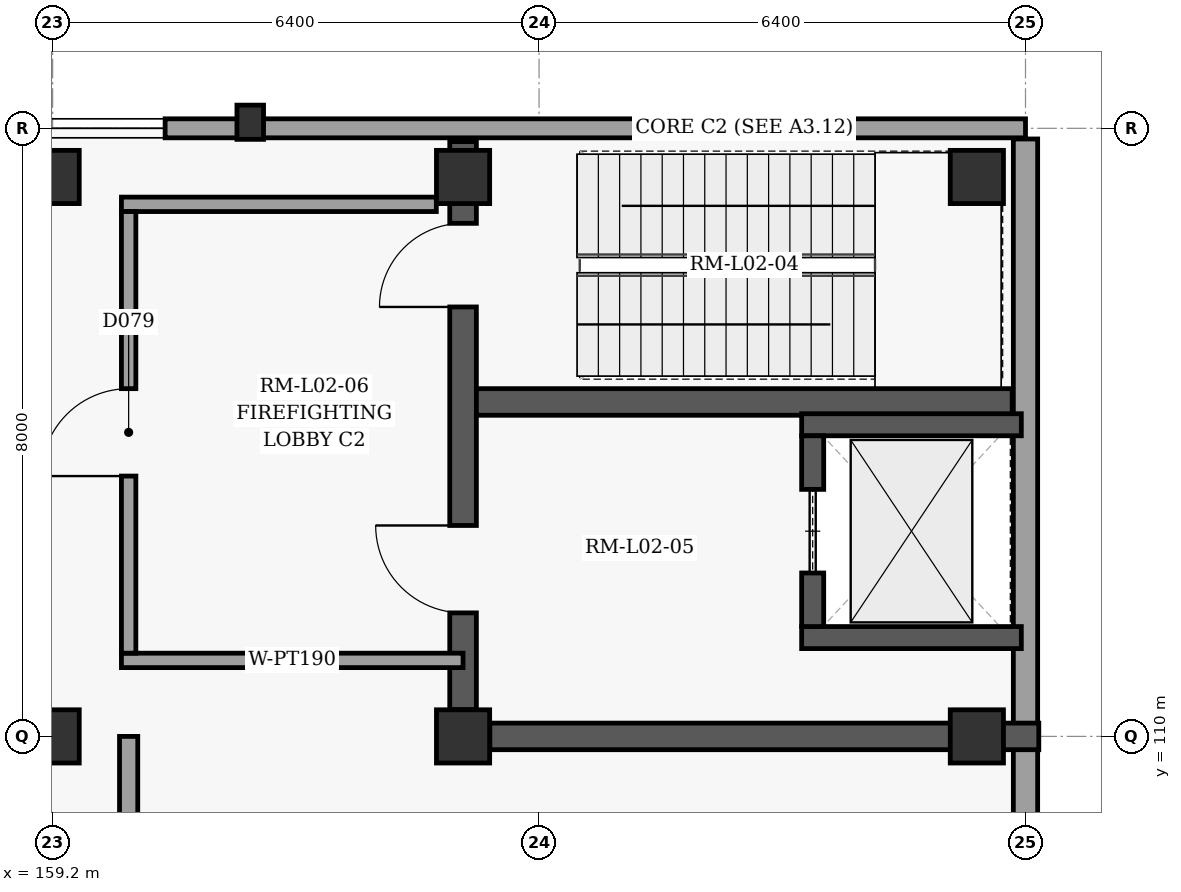
"""IFC4 building model, lengths in metres.
Left out: names, types, materials, properties, quantities, classifications, styles, units other than length and angle.
Written with IfcOpenShell. Run it as: python <this file> out.ifc"""

import sys

from ifc_helpers import new_model, si_unit, direction, frame, frame_2d, origin, origin_2d, place, context, subcontext, project, spatial, rectangle, extrude, element, fill, save


model = new_model("IFC4")
c1 = context("Model", 3, precision=1e-05, world=origin(), true_north=direction((0.0, 1.0)))
c2 = subcontext(c1, "Body", "Model", "MODEL_VIEW")
j1 = project(units=[si_unit("LENGTHUNIT", "METRE"), si_unit("PLANEANGLEUNIT", "RADIAN")], contexts=[c1])
p1 = place(None, origin())
s1 = spatial("IfcSite", under=j1, at=p1, CompositionType="ELEMENT")
p2 = place(p1, origin())
s2 = spatial("IfcBuilding", under=s1, at=p2, CompositionType="ELEMENT")
p3 = place(p2, frame((0.0, 0.0, 10.2)))
s3 = spatial("IfcBuildingStorey", under=s2, at=p3, CompositionType="ELEMENT", Elevation=10.2)
for number, where, z_axis, x_axis in (
    (1, (159.2, 110.0, 0.0), (0.0, 0.0, 1.0), (1.0, 0.0, 0.0)),
    (2, (159.2, 117.36, 0.0), (0.0, 0.0, 1.0), (1.0, 0.0, 0.0)),
    (3, (164.6, 110.0, 0.0), (0.0, 0.0, 1.0), (1.0, 0.0, 0.0)),
    (4, (164.6, 117.36, 0.0), (0.0, 0.0, 1.0), (1.0, 0.0, 0.0)),
    (5, (171.36, 110.0, 0.0), (0.0, 0.0, 1.0), (1.0, 0.0, 0.0)),
    (6, (171.36, 117.36, 0.0), (0.0, 0.0, 1.0), (1.0, 0.0, 0.0)),
):
    element("IfcColumn", number, at=place(p3, frame(where, z_axis=z_axis, x_axis=x_axis)), inside=s3, PredefinedType="COLUMN", context=c2, shape_type="SweptSolid", body=[
        extrude(rectangle(XDim=0.7, YDim=0.7, at=origin_2d()), origin(), (0.0, 0.0, 1.0), 5.4),
    ])
p4 = place(p3, frame((161.8, 118.08, 0.0), z_axis=(0.0, 0.0, 1.0), x_axis=(0.0, 1.0, 0.0)))
e7 = element("IfcColumn", 7, at=p4, inside=s3, PredefinedType="PILASTER", context=c2, shape_type="SweptSolid", body=[
    extrude(rectangle(XDim=0.35, YDim=0.45, at=origin_2d()), origin(), (0.0, 0.0, 1.0), 5.4),
])
p5 = place(p3, frame((139.6, 118.0, 0.0), z_axis=(0.0, 0.0, 1.0), x_axis=(1.0, 0.0, 0.0)))
e8 = element("IfcWall", 8, at=p5, inside=s3, PredefinedType="SOLIDWALL", context=c2, shape_type="SweptSolid", body=[
    extrude(rectangle(XDim=32.4, YDim=0.25, at=frame_2d((16.2, 0.0))), origin(), (0.0, 0.0, 1.0), 5.16),
])
p6 = place(p5, frame((2.2, 0.0, 0.9)))
e9 = element("IfcOpeningElement", 9, at=p6, cuts=e8, PredefinedType="OPENING", context=c2, shape_type="SweptSolid", body=[
    extrude(rectangle(XDim=3.4, YDim=2.55, at=frame_2d((1.7, 1.275))), frame((0.0, 0.135, 0.0), z_axis=(0.0, -1.0, 0.0), x_axis=(1.0, 0.0, 0.0)), (0.0, 0.0, 1.0), 0.27),
])
p7 = place(p5, frame((7.96, 0.0, 0.9)))
e10 = element("IfcOpeningElement", 10, at=p7, cuts=e8, PredefinedType="OPENING", context=c2, shape_type="SweptSolid", body=[
    extrude(rectangle(XDim=3.5, YDim=2.55, at=frame_2d((1.75, 1.275))), frame((0.0, 0.135, 0.0), z_axis=(0.0, -1.0, 0.0), x_axis=(1.0, 0.0, 0.0)), (0.0, 0.0, 1.0), 0.27),
])
p8 = place(p5, frame((12.27, 0.0, 0.9)))
e11 = element("IfcOpeningElement", 11, at=p8, cuts=e8, PredefinedType="OPENING", context=c2, shape_type="SweptSolid", body=[
    extrude(rectangle(XDim=3.6, YDim=2.6, at=frame_2d((1.8, 1.3))), frame((0.0, 0.135, 0.0), z_axis=(0.0, -1.0, 0.0), x_axis=(1.0, 0.0, 0.0)), (0.0, 0.0, 1.0), 0.27),
])
p9 = place(p5, frame((19.48, 0.0, 0.9)))
e12 = element("IfcOpeningElement", 12, at=p9, cuts=e8, PredefinedType="OPENING", context=c2, shape_type="SweptSolid", body=[
    extrude(rectangle(XDim=1.6, YDim=1.65, at=frame_2d((0.8, 0.825))), frame((0.0, 0.135, 0.0), z_axis=(0.0, -1.0, 0.0), x_axis=(1.0, 0.0, 0.0)), (0.0, 0.0, 1.0), 0.27),
])
p10 = place(p3, frame((172.0, 117.86, 0.0), z_axis=(0.0, 0.0, 1.0), x_axis=(0.0, -1.0, 0.0)))
e13 = element("IfcWall", 13, at=p10, inside=s3, PredefinedType="SOLIDWALL", context=c2, shape_type="SweptSolid", body=[
    extrude(rectangle(XDim=46.12, YDim=0.32, at=frame_2d((23.06, 0.0))), origin(), (0.0, 0.0, 1.0), 5.16),
])
p11 = place(p3, frame((164.952, 110.0, 0.0), z_axis=(0.0, 0.0, 1.0), x_axis=(1.0, 0.0, 0.0)))
e14 = element("IfcWall", 14, at=p11, inside=s3, PredefinedType="SHEAR", context=c2, shape_type="SweptSolid", body=[
    extrude(rectangle(XDim=7.223, YDim=0.35, at=frame_2d((3.612, 0.0))), origin(), (0.0, 0.0, 1.0), 5.16),
])
p12 = place(p3, frame((164.6, 110.352, 0.0), z_axis=(0.0, 0.0, 1.0), x_axis=(0.0, 1.0, 0.0)))
e15 = element("IfcWall", 15, at=p12, inside=s3, PredefinedType="SHEAR", context=c2, shape_type="SweptSolid", body=[
    extrude(rectangle(XDim=7.473, YDim=0.35, at=frame_2d((3.736, 0.0))), origin(), (0.0, 0.0, 1.0), 5.16),
])
p13 = place(p12, frame((5.298, 0.0, 0.0)))
e16 = element("IfcOpeningElement", 16, at=p13, cuts=e15, PredefinedType="OPENING", context=c2, shape_type="SweptSolid", body=[
    extrude(rectangle(XDim=1.1, YDim=2.15, at=frame_2d((0.55, 1.075))), frame((0.0, 0.185, 0.0), z_axis=(0.0, -1.0, 0.0), x_axis=(1.0, 0.0, 0.0)), (0.0, 0.0, 1.0), 0.37),
])
p14 = place(p12, frame((1.273, 0.0, 0.0)))
e17 = element("IfcOpeningElement", 17, at=p14, cuts=e15, PredefinedType="OPENING", context=c2, shape_type="SweptSolid", body=[
    extrude(rectangle(XDim=1.15, YDim=2.2, at=frame_2d((0.575, 1.1))), frame((0.0, 0.185, 0.0), z_axis=(0.0, -1.0, 0.0), x_axis=(1.0, 0.0, 0.0)), (0.0, 0.0, 1.0), 0.37),
])
p15 = place(p3, frame((164.775, 114.4, 0.0), z_axis=(0.0, 0.0, 1.0), x_axis=(1.0, 0.0, 0.0)))
e18 = element("IfcWall", 18, at=p15, inside=s3, PredefinedType="SHEAR", context=c2, shape_type="SweptSolid", body=[
    extrude(rectangle(XDim=7.05, YDim=0.35, at=frame_2d((3.525, 0.0))), origin(), (0.0, 0.0, 1.0), 5.16),
])
for number, where, z_axis, x_axis in (
    (19, (169.055, 111.3, 0.0), (0.0, 0.0, 1.0), (1.0, 0.0, 0.0)),
    (20, (169.055, 114.1, 0.0), (0.0, 0.0, 1.0), (1.0, 0.0, 0.0)),
):
    element("IfcWall", number, at=place(p3, frame(where, z_axis=z_axis, x_axis=x_axis)), inside=s3, PredefinedType="SHEAR", context=c2, shape_type="SweptSolid", body=[
        extrude(rectangle(XDim=2.89, YDim=0.29, at=frame_2d((1.445, 0.0))), origin(), (0.0, 0.0, 1.0), 5.16),
    ])
p16 = place(p3, frame((169.2, 111.445, 0.0), z_axis=(0.0, 0.0, 1.0), x_axis=(0.0, 1.0, 0.0)))
e21 = element("IfcWall", 21, at=p16, inside=s3, PredefinedType="SHEAR", context=c2, shape_type="SweptSolid", body=[
    extrude(rectangle(XDim=2.51, YDim=0.29, at=frame_2d((1.255, 0.0))), origin(), (0.0, 0.0, 1.0), 5.16),
])
p17 = place(p16, frame((0.705, 0.0, 0.0)))
e22 = element("IfcOpeningElement", 22, at=p17, cuts=e21, PredefinedType="OPENING", context=c2, shape_type="SweptSolid", body=[
    extrude(rectangle(XDim=1.1, YDim=2.15, at=frame_2d((0.55, 1.075))), frame((0.0, 0.155, 0.0), z_axis=(0.0, -1.0, 0.0), x_axis=(1.0, 0.0, 0.0)), (0.0, 0.0, 1.0), 0.31),
])
p18 = place(p3, frame((160.105, 111.0, 0.0), z_axis=(0.0, 0.0, 1.0), x_axis=(1.0, 0.0, 0.0)))
e23 = element("IfcWall", 23, at=p18, inside=s3, PredefinedType="PARTITIONING", context=c2, shape_type="SweptSolid", body=[
    extrude(rectangle(XDim=4.495, YDim=0.19, at=frame_2d((2.248, 0.0))), origin(), (0.0, 0.0, 1.0), 5.16),
])
p19 = place(p3, frame((160.105, 117.0, 0.0), z_axis=(0.0, 0.0, 1.0), x_axis=(1.0, 0.0, 0.0)))
e24 = element("IfcWall", 24, at=p19, inside=s3, PredefinedType="PARTITIONING", context=c2, shape_type="SweptSolid", body=[
    extrude(rectangle(XDim=4.143, YDim=0.19, at=frame_2d((2.072, 0.0))), origin(), (0.0, 0.0, 1.0), 4.51),
])
p20 = place(p3, frame((160.2, 111.095, 0.0), z_axis=(0.0, 0.0, 1.0), x_axis=(0.0, 1.0, 0.0)))
e25 = element("IfcWall", 25, at=p20, inside=s3, PredefinedType="PARTITIONING", context=c2, shape_type="SweptSolid", body=[
    extrude(rectangle(XDim=5.81, YDim=0.19, at=frame_2d((2.905, 0.0))), origin(), (0.0, 0.0, 1.0), 5.16),
])
p21 = place(p20, frame((2.33, 0.0, 0.0)))
e26 = element("IfcOpeningElement", 26, at=p21, cuts=e25, PredefinedType="OPENING", context=c2, shape_type="SweptSolid", body=[
    extrude(rectangle(XDim=1.15, YDim=2.2, at=frame_2d((0.575, 1.1))), frame((0.0, 0.105, 0.0), z_axis=(0.0, -1.0, 0.0), x_axis=(1.0, 0.0, 0.0)), (0.0, 0.0, 1.0), 0.21),
])
p22 = place(p3, frame((160.2, 110.0, 0.0), z_axis=(0.0, 0.0, 1.0), x_axis=(0.0, -1.0, 0.0)))
e27 = element("IfcWall", 27, at=p22, inside=s3, PredefinedType="PARTITIONING", context=c2, shape_type="SweptSolid", body=[
    extrude(rectangle(XDim=8.0, YDim=0.24, at=frame_2d((4.0, 0.0))), origin(), (0.0, 0.0, 1.0), 5.16),
])
p23 = place(p9, origin())
e28 = element("IfcWindow", 28, at=p23, inside=s3, PartitioningType="SINGLE_PANEL", PredefinedType="WINDOW", context=c2, shape_type="SweptSolid", body=[
    extrude(rectangle(XDim=1.6, YDim=1.65, at=frame_2d((0.8, 0.825))), frame((0.0, 0.03, 0.0), z_axis=(0.0, -1.0, 0.0), x_axis=(1.0, 0.0, 0.0)), (0.0, 0.0, 1.0), 0.06),
])
fill(e12, e28)
p24 = place(p13, origin())
e29 = element("IfcDoor", 29, at=p24, inside=s3, OperationType="SINGLE_SWING_LEFT", PredefinedType="DOOR", context=c2, shape_type="SweptSolid", body=[
    extrude(rectangle(XDim=1.1, YDim=2.15, at=frame_2d((0.55, 1.075))), frame((0.0, 0.025, 0.0), z_axis=(0.0, -1.0, 0.0), x_axis=(1.0, 0.0, 0.0)), (0.0, 0.0, 1.0), 0.05),
])
fill(e16, e29)
p25 = place(p14, origin())
e30 = element("IfcDoor", 30, at=p25, inside=s3, OperationType="SINGLE_SWING_RIGHT", PredefinedType="DOOR", context=c2, shape_type="SweptSolid", body=[
    extrude(rectangle(XDim=1.15, YDim=2.2, at=frame_2d((0.575, 1.1))), frame((0.0, 0.025, 0.0), z_axis=(0.0, -1.0, 0.0), x_axis=(1.0, 0.0, 0.0)), (0.0, 0.0, 1.0), 0.05),
])
fill(e17, e30)
p26 = place(p17, origin())
e31 = element("IfcDoor", 31, at=p26, inside=s3, OperationType="SLIDING_TO_LEFT", PredefinedType="DOOR", context=c2, shape_type="SweptSolid", body=[
    extrude(rectangle(XDim=1.1, YDim=2.15, at=frame_2d((0.55, 1.075))), frame((0.0, 0.025, 0.0), z_axis=(0.0, -1.0, 0.0), x_axis=(1.0, 0.0, 0.0)), (0.0, 0.0, 1.0), 0.05),
])
fill(e22, e31)
p27 = place(p21, origin())
e32 = element("IfcDoor", 32, at=p27, inside=s3, OperationType="SINGLE_SWING_LEFT", PredefinedType="DOOR", context=c2, shape_type="SweptSolid", body=[
    extrude(rectangle(XDim=1.15, YDim=2.2, at=frame_2d((0.575, 1.1))), frame((0.0, 0.025, 0.0), z_axis=(0.0, -1.0, 0.0), x_axis=(1.0, 0.0, 0.0)), (0.0, 0.0, 1.0), 0.05),
])
fill(e26, e32)
save(model, sys.argv[1])
